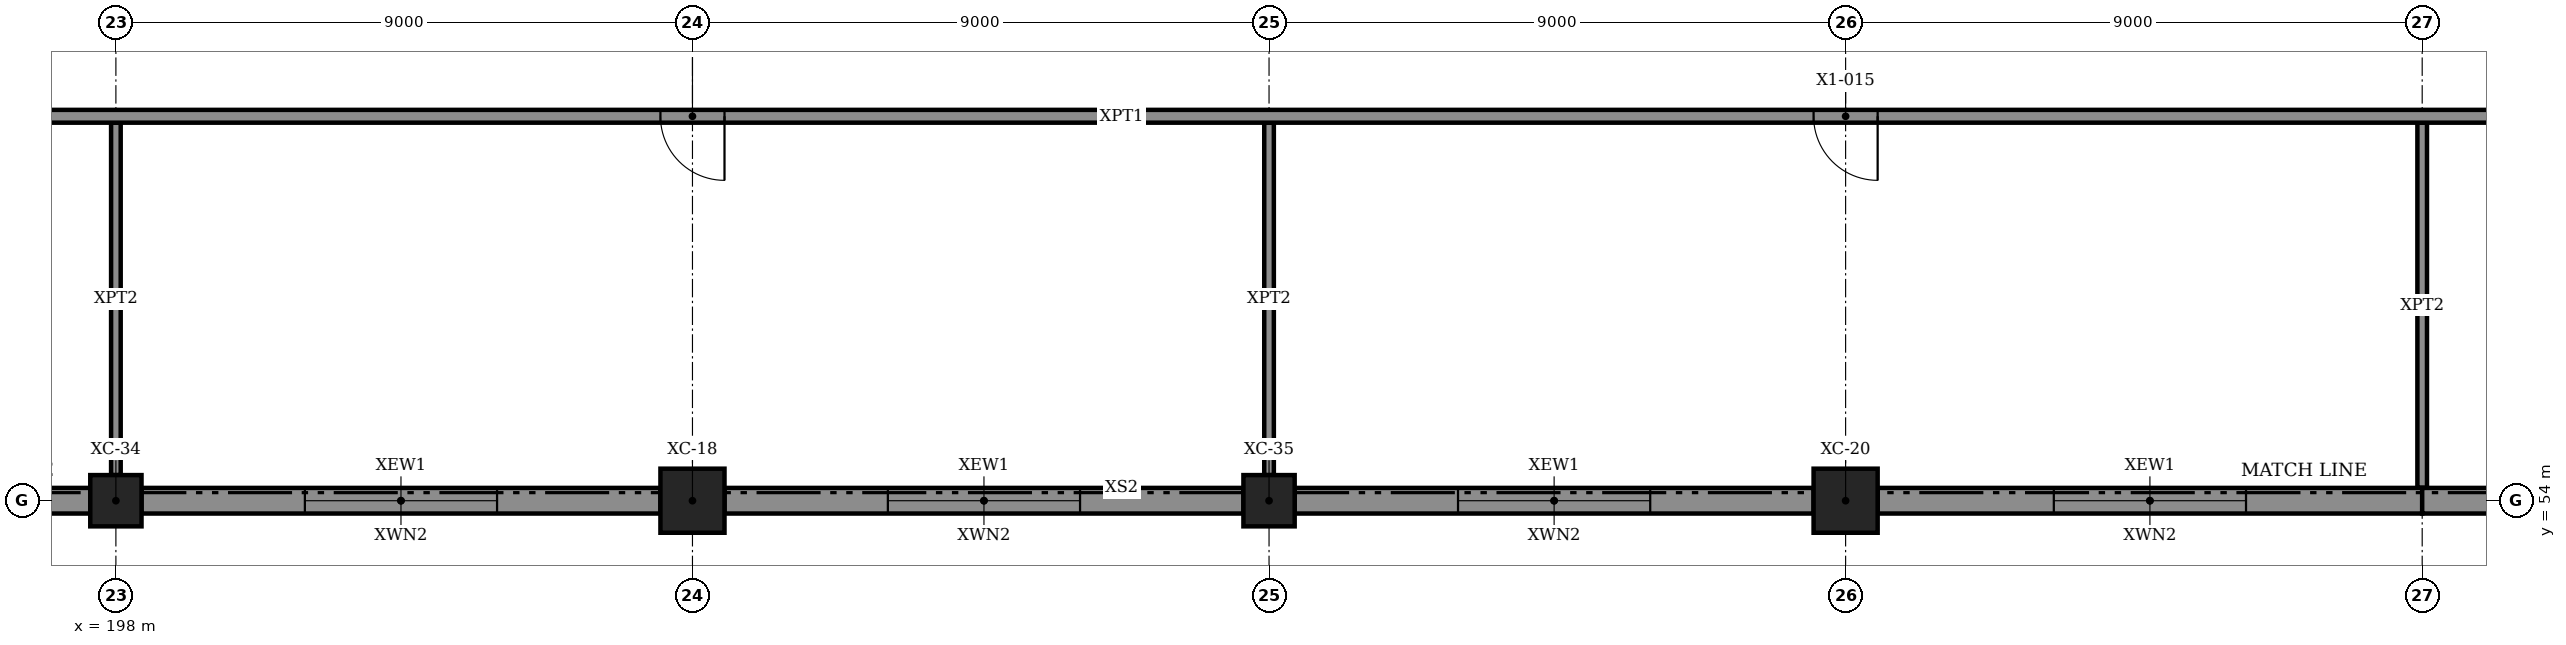
"""IFC4 building model, lengths in metres.
Left out: names, types, materials, properties, quantities, classifications, styles, units other than length and angle.
Written with IfcOpenShell. Run it as: python <this file> out.ifc"""

import sys

from ifc_helpers import new_model, si_unit, direction, frame, frame_2d, origin, origin_2d, place, context, subcontext, project, spatial, rectangle, hollow_rectangle, extrude, element, fill, save


model = new_model("IFC4")
c1 = context("Model", 3, precision=1e-05, world=origin(), true_north=direction((0.0, 1.0)))
c2 = subcontext(c1, "Body", "Model", "MODEL_VIEW")
j1 = project(units=[si_unit("LENGTHUNIT", "METRE"), si_unit("PLANEANGLEUNIT", "RADIAN")], contexts=[c1])
p1 = place(None, origin())
s1 = spatial("IfcSite", under=j1, at=p1, CompositionType="ELEMENT")
p2 = place(p1, origin())
s2 = spatial("IfcBuilding", under=s1, at=p2, CompositionType="ELEMENT")
p3 = place(p2, frame((0.0, 0.0, 6.0)))
s3 = spatial("IfcBuildingStorey", under=s2, at=p3, CompositionType="ELEMENT", Elevation=6.0)
for number, where, z_axis, x_axis in (
    (1, (207.0, 54.0, 0.0), (0.0, 0.0, 1.0), (1.0, 0.0, 0.0)),
    (2, (225.0, 54.0, 0.0), (0.0, 0.0, 1.0), (1.0, 0.0, 0.0)),
):
    element("IfcColumn", number, at=place(p3, frame(where, z_axis=z_axis, x_axis=x_axis)), inside=s3, PredefinedType="COLUMN", context=c2, shape_type="SweptSolid", body=[
        extrude(hollow_rectangle(XDim=1.0, YDim=1.0, WallThickness=0.032, at=origin_2d()), origin(), (0.0, 0.0, 1.0), 5.5),
    ])
for number, where, z_axis, x_axis in (
    (3, (198.0, 54.0, 0.0), (0.0, 0.0, 1.0), (1.0, 0.0, 0.0)),
    (4, (216.0, 54.0, 0.0), (0.0, 0.0, 1.0), (1.0, 0.0, 0.0)),
):
    element("IfcColumn", number, at=place(p3, frame(where, z_axis=z_axis, x_axis=x_axis)), inside=s3, PredefinedType="COLUMN", context=c2, shape_type="SweptSolid", body=[
        extrude(rectangle(XDim=0.8, YDim=0.8, at=origin_2d()), origin(), (0.0, 0.0, 1.0), 5.5),
    ])
p4 = place(p3, frame((189.5, 54.0, -0.28), z_axis=(0.0, 0.0, 1.0), x_axis=(1.0, 0.0, 0.0)))
e5 = element("IfcWall", 5, at=p4, inside=s3, PredefinedType="SOLIDWALL", context=c2, shape_type="SweptSolid", body=[
    extrude(rectangle(XDim=8.1, YDim=0.4, at=frame_2d((4.05, 0.0))), origin(), (0.0, 0.0, 1.0), 5.78),
])
p5 = place(p4, frame((2.55, 0.0, 1.18)))
e6 = element("IfcOpeningElement", 6, at=p5, cuts=e5, PredefinedType="OPENING", context=c2, shape_type="SweptSolid", body=[
    extrude(rectangle(XDim=3.0, YDim=1.8, at=frame_2d((1.5, 0.9))), frame((0.0, 0.21, 0.0), z_axis=(0.0, -1.0, 0.0), x_axis=(1.0, 0.0, 0.0)), (0.0, 0.0, 1.0), 0.42),
])
p6 = place(p3, frame((198.4, 54.0, -0.28), z_axis=(0.0, 0.0, 1.0), x_axis=(1.0, 0.0, 0.0)))
e7 = element("IfcWall", 7, at=p6, inside=s3, PredefinedType="SOLIDWALL", context=c2, shape_type="SweptSolid", body=[
    extrude(rectangle(XDim=8.1, YDim=0.4, at=frame_2d((4.05, 0.0))), origin(), (0.0, 0.0, 1.0), 5.78),
])
p7 = place(p6, frame((2.55, 0.0, 1.18)))
e8 = element("IfcOpeningElement", 8, at=p7, cuts=e7, PredefinedType="OPENING", context=c2, shape_type="SweptSolid", body=[
    extrude(rectangle(XDim=3.0, YDim=1.8, at=frame_2d((1.5, 0.9))), frame((0.0, 0.21, 0.0), z_axis=(0.0, -1.0, 0.0), x_axis=(1.0, 0.0, 0.0)), (0.0, 0.0, 1.0), 0.42),
])
p8 = place(p3, frame((207.5, 54.0, -0.28), z_axis=(0.0, 0.0, 1.0), x_axis=(1.0, 0.0, 0.0)))
e9 = element("IfcWall", 9, at=p8, inside=s3, PredefinedType="SOLIDWALL", context=c2, shape_type="SweptSolid", body=[
    extrude(rectangle(XDim=8.1, YDim=0.4, at=frame_2d((4.05, 0.0))), origin(), (0.0, 0.0, 1.0), 5.78),
])
p9 = place(p8, frame((2.55, 0.0, 1.18)))
e10 = element("IfcOpeningElement", 10, at=p9, cuts=e9, PredefinedType="OPENING", context=c2, shape_type="SweptSolid", body=[
    extrude(rectangle(XDim=3.0, YDim=1.8, at=frame_2d((1.5, 0.9))), frame((0.0, 0.21, 0.0), z_axis=(0.0, -1.0, 0.0), x_axis=(1.0, 0.0, 0.0)), (0.0, 0.0, 1.0), 0.42),
])
p10 = place(p3, frame((216.4, 54.0, -0.28), z_axis=(0.0, 0.0, 1.0), x_axis=(1.0, 0.0, 0.0)))
e11 = element("IfcWall", 11, at=p10, inside=s3, PredefinedType="SOLIDWALL", context=c2, shape_type="SweptSolid", body=[
    extrude(rectangle(XDim=8.1, YDim=0.4, at=frame_2d((4.05, 0.0))), origin(), (0.0, 0.0, 1.0), 5.78),
])
p11 = place(p10, frame((2.55, 0.0, 1.18)))
e12 = element("IfcOpeningElement", 12, at=p11, cuts=e11, PredefinedType="OPENING", context=c2, shape_type="SweptSolid", body=[
    extrude(rectangle(XDim=3.0, YDim=1.8, at=frame_2d((1.5, 0.9))), frame((0.0, 0.21, 0.0), z_axis=(0.0, -1.0, 0.0), x_axis=(1.0, 0.0, 0.0)), (0.0, 0.0, 1.0), 0.42),
])
p12 = place(p3, frame((225.5, 54.0, -0.28), z_axis=(0.0, 0.0, 1.0), x_axis=(1.0, 0.0, 0.0)))
e13 = element("IfcWall", 13, at=p12, inside=s3, PredefinedType="SOLIDWALL", context=c2, shape_type="SweptSolid", body=[
    extrude(rectangle(XDim=8.5, YDim=0.4, at=frame_2d((4.25, 0.0))), origin(), (0.0, 0.0, 1.0), 5.78),
])
p13 = place(p12, frame((2.75, 0.0, 1.18)))
e14 = element("IfcOpeningElement", 14, at=p13, cuts=e13, PredefinedType="OPENING", context=c2, shape_type="SweptSolid", body=[
    extrude(rectangle(XDim=3.0, YDim=1.8, at=frame_2d((1.5, 0.9))), frame((0.0, 0.21, 0.0), z_axis=(0.0, -1.0, 0.0), x_axis=(1.0, 0.0, 0.0)), (0.0, 0.0, 1.0), 0.42),
])
p14 = place(p3, frame((234.0, 54.0, -0.28), z_axis=(0.0, 0.0, 1.0), x_axis=(1.0, 0.0, 0.0)))
e15 = element("IfcWall", 15, at=p14, inside=s3, PredefinedType="SOLIDWALL", context=c2, shape_type="SweptSolid", body=[
    extrude(rectangle(XDim=8.5, YDim=0.4, at=frame_2d((4.25, 0.0))), origin(), (0.0, 0.0, 1.0), 5.78),
])
p15 = place(p14, frame((2.75, 0.0, 1.18)))
e16 = element("IfcOpeningElement", 16, at=p15, cuts=e15, PredefinedType="OPENING", context=c2, shape_type="SweptSolid", body=[
    extrude(rectangle(XDim=3.0, YDim=1.8, at=frame_2d((1.5, 0.9))), frame((0.0, 0.21, 0.0), z_axis=(0.0, -1.0, 0.0), x_axis=(1.0, 0.0, 0.0)), (0.0, 0.0, 1.0), 0.42),
])
p16 = place(p3, frame((99.2, 60.0, 0.0), z_axis=(0.0, 0.0, 1.0), x_axis=(1.0, 0.0, 0.0)))
e17 = element("IfcWall", 17, at=p16, inside=s3, PredefinedType="PARTITIONING", context=c2, shape_type="SweptSolid", body=[
    extrude(rectangle(XDim=161.6, YDim=0.2, at=frame_2d((80.8, 0.0))), origin(), (0.0, 0.0, 1.0), 5.25),
])
p17 = place(p16, frame((8.3, 0.0, 0.015)))
e18 = element("IfcOpeningElement", 18, at=p17, cuts=e17, PredefinedType="OPENING", context=c2, shape_type="SweptSolid", body=[
    extrude(rectangle(XDim=1.0, YDim=2.4, at=frame_2d((0.5, 1.2))), frame((0.0, 0.11, 0.0), z_axis=(0.0, -1.0, 0.0), x_axis=(1.0, 0.0, 0.0)), (0.0, 0.0, 1.0), 0.22),
])
p18 = place(p16, frame((26.3, 0.0, 0.015)))
e19 = element("IfcOpeningElement", 19, at=p18, cuts=e17, PredefinedType="OPENING", context=c2, shape_type="SweptSolid", body=[
    extrude(rectangle(XDim=1.0, YDim=2.4, at=frame_2d((0.5, 1.2))), frame((0.0, 0.11, 0.0), z_axis=(0.0, -1.0, 0.0), x_axis=(1.0, 0.0, 0.0)), (0.0, 0.0, 1.0), 0.22),
])
p19 = place(p16, frame((44.3, 0.0, 0.015)))
e20 = element("IfcOpeningElement", 20, at=p19, cuts=e17, PredefinedType="OPENING", context=c2, shape_type="SweptSolid", body=[
    extrude(rectangle(XDim=1.0, YDim=2.4, at=frame_2d((0.5, 1.2))), frame((0.0, 0.11, 0.0), z_axis=(0.0, -1.0, 0.0), x_axis=(1.0, 0.0, 0.0)), (0.0, 0.0, 1.0), 0.22),
])
p20 = place(p16, frame((66.8, 0.0, 0.015)))
e21 = element("IfcOpeningElement", 21, at=p20, cuts=e17, PredefinedType="OPENING", context=c2, shape_type="SweptSolid", body=[
    extrude(rectangle(XDim=1.0, YDim=2.4, at=frame_2d((0.5, 1.2))), frame((0.0, 0.11, 0.0), z_axis=(0.0, -1.0, 0.0), x_axis=(1.0, 0.0, 0.0)), (0.0, 0.0, 1.0), 0.22),
])
p21 = place(p16, frame((89.3, 0.0, 0.015)))
e22 = element("IfcOpeningElement", 22, at=p21, cuts=e17, PredefinedType="OPENING", context=c2, shape_type="SweptSolid", body=[
    extrude(rectangle(XDim=1.0, YDim=2.4, at=frame_2d((0.5, 1.2))), frame((0.0, 0.11, 0.0), z_axis=(0.0, -1.0, 0.0), x_axis=(1.0, 0.0, 0.0)), (0.0, 0.0, 1.0), 0.22),
])
p22 = place(p16, frame((107.3, 0.0, 0.015)))
e23 = element("IfcOpeningElement", 23, at=p22, cuts=e17, PredefinedType="OPENING", context=c2, shape_type="SweptSolid", body=[
    extrude(rectangle(XDim=1.0, YDim=2.4, at=frame_2d((0.5, 1.2))), frame((0.0, 0.11, 0.0), z_axis=(0.0, -1.0, 0.0), x_axis=(1.0, 0.0, 0.0)), (0.0, 0.0, 1.0), 0.22),
])
p23 = place(p16, frame((125.3, 0.0, 0.015)))
e24 = element("IfcOpeningElement", 24, at=p23, cuts=e17, PredefinedType="OPENING", context=c2, shape_type="SweptSolid", body=[
    extrude(rectangle(XDim=1.0, YDim=2.4, at=frame_2d((0.5, 1.2))), frame((0.0, 0.11, 0.0), z_axis=(0.0, -1.0, 0.0), x_axis=(1.0, 0.0, 0.0)), (0.0, 0.0, 1.0), 0.22),
])
p24 = place(p16, frame((147.8, 0.0, 0.015)))
e25 = element("IfcOpeningElement", 25, at=p24, cuts=e17, PredefinedType="OPENING", context=c2, shape_type="SweptSolid", body=[
    extrude(rectangle(XDim=1.0, YDim=2.4, at=frame_2d((0.5, 1.2))), frame((0.0, 0.11, 0.0), z_axis=(0.0, -1.0, 0.0), x_axis=(1.0, 0.0, 0.0)), (0.0, 0.0, 1.0), 0.22),
])
for number, where, z_axis, x_axis in (
    (26, (198.0, 54.4, 0.0), (0.0, 0.0, 1.0), (0.0, 1.0, 0.0)),
    (27, (216.0, 54.4, 0.0), (0.0, 0.0, 1.0), (0.0, 1.0, 0.0)),
):
    element("IfcWall", number, at=place(p3, frame(where, z_axis=z_axis, x_axis=x_axis)), inside=s3, PredefinedType="PARTITIONING", context=c2, shape_type="SweptSolid", body=[
        extrude(rectangle(XDim=5.5, YDim=0.15, at=frame_2d((2.75, 0.0))), origin(), (0.0, 0.0, 1.0), 5.25),
    ])
p25 = place(p3, frame((234.0, 54.2, 0.0), z_axis=(0.0, 0.0, 1.0), x_axis=(0.0, 1.0, 0.0)))
e28 = element("IfcWall", 28, at=p25, inside=s3, PredefinedType="PARTITIONING", context=c2, shape_type="SweptSolid", body=[
    extrude(rectangle(XDim=5.7, YDim=0.15, at=frame_2d((2.85, 0.0))), origin(), (0.0, 0.0, 1.0), 5.25),
])
p26 = place(p7, origin())
e29 = element("IfcWindow", 29, at=p26, inside=s3, PartitioningType="TRIPLE_PANEL_VERTICAL", PredefinedType="WINDOW", context=c2, shape_type="SweptSolid", body=[
    extrude(rectangle(XDim=3.0, YDim=1.8, at=frame_2d((1.5, 0.9))), frame((0.0, 0.03, 0.0), z_axis=(0.0, -1.0, 0.0), x_axis=(1.0, 0.0, 0.0)), (0.0, 0.0, 1.0), 0.06),
])
fill(e8, e29)
p27 = place(p9, origin())
e30 = element("IfcWindow", 30, at=p27, inside=s3, PartitioningType="TRIPLE_PANEL_VERTICAL", PredefinedType="WINDOW", context=c2, shape_type="SweptSolid", body=[
    extrude(rectangle(XDim=3.0, YDim=1.8, at=frame_2d((1.5, 0.9))), frame((0.0, 0.03, 0.0), z_axis=(0.0, -1.0, 0.0), x_axis=(1.0, 0.0, 0.0)), (0.0, 0.0, 1.0), 0.06),
])
fill(e10, e30)
p28 = place(p11, origin())
e31 = element("IfcWindow", 31, at=p28, inside=s3, PartitioningType="TRIPLE_PANEL_VERTICAL", PredefinedType="WINDOW", context=c2, shape_type="SweptSolid", body=[
    extrude(rectangle(XDim=3.0, YDim=1.8, at=frame_2d((1.5, 0.9))), frame((0.0, 0.03, 0.0), z_axis=(0.0, -1.0, 0.0), x_axis=(1.0, 0.0, 0.0)), (0.0, 0.0, 1.0), 0.06),
])
fill(e12, e31)
p29 = place(p13, origin())
e32 = element("IfcWindow", 32, at=p29, inside=s3, PartitioningType="TRIPLE_PANEL_VERTICAL", PredefinedType="WINDOW", context=c2, shape_type="SweptSolid", body=[
    extrude(rectangle(XDim=3.0, YDim=1.8, at=frame_2d((1.5, 0.9))), frame((0.0, 0.03, 0.0), z_axis=(0.0, -1.0, 0.0), x_axis=(1.0, 0.0, 0.0)), (0.0, 0.0, 1.0), 0.06),
])
fill(e14, e32)
p30 = place(p22, frame((1.0, 0.0, 0.0), z_axis=(0.0, 0.0, 1.0), x_axis=(-1.0, 0.0, 0.0)))
e33 = element("IfcDoor", 33, at=p30, inside=s3, OperationType="SINGLE_SWING_RIGHT", PredefinedType="DOOR", context=c2, shape_type="SweptSolid", body=[
    extrude(rectangle(XDim=1.0, YDim=2.4, at=frame_2d((0.5, 1.2))), frame((0.0, 0.025, 0.0), z_axis=(0.0, -1.0, 0.0), x_axis=(1.0, 0.0, 0.0)), (0.0, 0.0, 1.0), 0.05),
])
fill(e23, e33)
p31 = place(p23, frame((1.0, 0.0, 0.0), z_axis=(0.0, 0.0, 1.0), x_axis=(-1.0, 0.0, 0.0)))
e34 = element("IfcDoor", 34, at=p31, inside=s3, OperationType="SINGLE_SWING_RIGHT", PredefinedType="DOOR", context=c2, shape_type="SweptSolid", body=[
    extrude(rectangle(XDim=1.0, YDim=2.4, at=frame_2d((0.5, 1.2))), frame((0.0, 0.025, 0.0), z_axis=(0.0, -1.0, 0.0), x_axis=(1.0, 0.0, 0.0)), (0.0, 0.0, 1.0), 0.05),
])
fill(e24, e34)
save(model, sys.argv[1])
